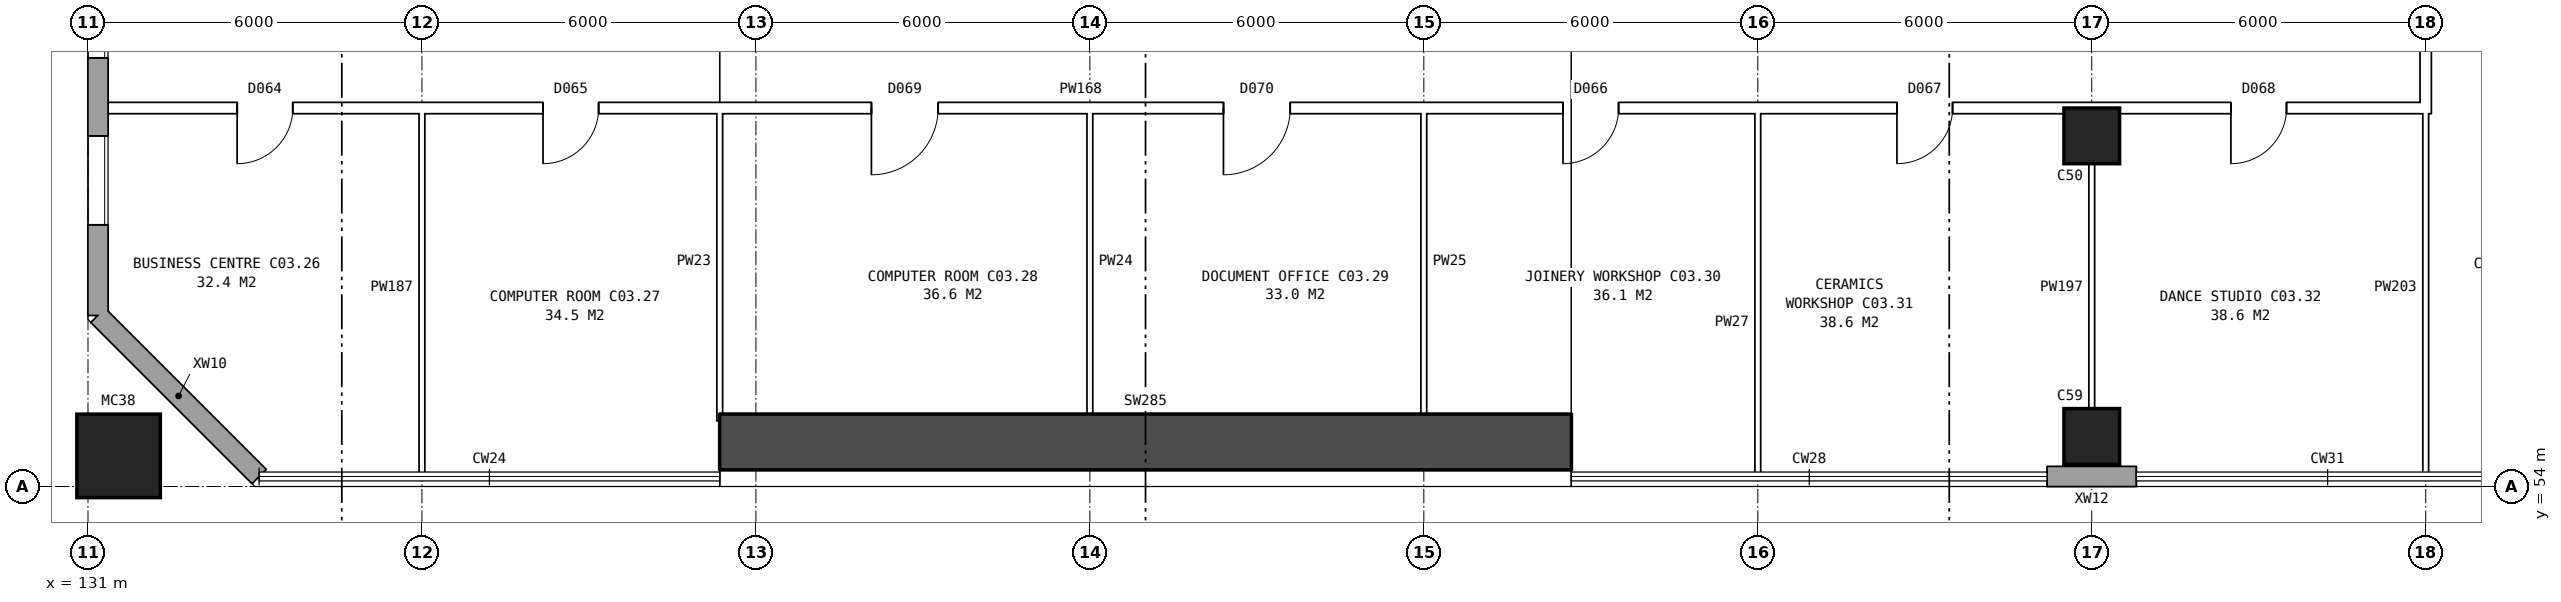
"""IFC4 building model, lengths in metres.
Left out: names, types, materials, properties, quantities, classifications, styles, units other than length and angle.
Written with IfcOpenShell. Run it as: python <this file> out.ifc"""

import sys

from ifc_helpers import new_model, si_unit, direction, frame, frame_2d, origin, origin_2d, place, context, subcontext, project, spatial, rectangle, hollow_rectangle, extrude, element, fill, save


model = new_model("IFC4")
c1 = context("Model", 3, precision=1e-05, world=origin(), true_north=direction((0.0, 1.0)))
c2 = subcontext(c1, "Body", "Model", "MODEL_VIEW")
j1 = project(units=[si_unit("LENGTHUNIT", "METRE"), si_unit("PLANEANGLEUNIT", "RADIAN")], contexts=[c1])
p1 = place(None, origin())
s1 = spatial("IfcSite", under=j1, at=p1, CompositionType="ELEMENT")
p2 = place(p1, origin())
s2 = spatial("IfcBuilding", under=s1, at=p2, CompositionType="ELEMENT")
p3 = place(p2, frame((0.0, 0.0, 14.7)))
s3 = spatial("IfcBuildingStorey", under=s2, at=p3, CompositionType="ELEMENT", Elevation=14.7)
p4 = place(p3, frame((142.35, 54.8, 0.0), z_axis=(0.0, 0.0, 1.0), x_axis=(1.0, 0.0, 0.0)))
e1 = element("IfcWall", 1, at=p4, inside=s3, PredefinedType="SHEAR", context=c2, shape_type="SweptSolid", body=[
    extrude(rectangle(XDim=15.3, YDim=1.0, at=frame_2d((7.65, 0.0))), origin(), (0.0, 0.0, 1.0), 4.0),
])
for number, where, z_axis, x_axis in (
    (2, (167.0, 54.9, 0.0), (0.0, 0.0, 1.0), (1.0, 0.0, 0.0)),
    (3, (167.0, 60.3, 0.0), (0.0, 0.0, 1.0), (1.0, 0.0, 0.0)),
):
    element("IfcColumn", number, at=place(p3, frame(where, z_axis=z_axis, x_axis=x_axis)), inside=s3, PredefinedType="COLUMN", context=c2, shape_type="SweptSolid", body=[
        extrude(rectangle(XDim=1.0, YDim=1.0, at=origin_2d()), origin(), (0.0, 0.0, 1.0), 4.0),
    ])
p5 = place(p3, frame((131.55, 54.55, 0.0), z_axis=(0.0, 0.0, 1.0), x_axis=(1.0, 0.0, 0.0)))
e4 = element("IfcColumn", 4, at=p5, inside=s3, PredefinedType="COLUMN", context=c2, shape_type="SweptSolid", body=[
    extrude(hollow_rectangle(XDim=1.5, YDim=1.5, WallThickness=0.08, at=origin_2d()), origin(), (0.0, 0.0, 1.0), 4.8),
])
p6 = place(p3, frame((131.18, 57.075, 0.0), z_axis=(0.0, 0.0, 1.0), x_axis=(0.707106781187, -0.707106781187, 0.0)))
e5 = element("IfcWall", 5, at=p6, inside=s3, PredefinedType="STANDARD", context=c2, shape_type="SweptSolid", body=[
    extrude(rectangle(XDim=4.094, YDim=0.36, at=frame_2d((2.047, 0.0))), origin(), (0.0, 0.0, 1.0), 4.0),
])
p7 = place(p3, frame((166.2, 54.18, 0.0), z_axis=(0.0, 0.0, 1.0), x_axis=(1.0, 0.0, 0.0)))
e6 = element("IfcWall", 6, at=p7, inside=s3, PredefinedType="STANDARD", context=c2, shape_type="SweptSolid", body=[
    extrude(rectangle(XDim=1.6, YDim=0.36, at=frame_2d((0.8, 0.0))), origin(), (0.0, 0.0, 1.0), 4.0),
])
p8 = place(p3, frame((131.18, 82.925, 0.0), z_axis=(0.0, 0.0, 1.0), x_axis=(0.0, -1.0, 0.0)))
e7 = element("IfcWall", 7, at=p8, inside=s3, PredefinedType="STANDARD", context=c2, shape_type="SweptSolid", body=[
    extrude(rectangle(XDim=25.851, YDim=0.36, at=frame_2d((12.925, 0.0))), origin(), (0.0, 0.0, 1.0), 4.0),
])
p9 = place(p8, frame((1.625, 0.0, 0.8)))
e8 = element("IfcOpeningElement", 8, at=p9, cuts=e7, PredefinedType="OPENING", context=c2, shape_type="SweptSolid", body=[
    extrude(rectangle(XDim=1.6, YDim=1.8, at=frame_2d((0.8, 0.9))), frame((0.0, 0.19, 0.0), z_axis=(0.0, -1.0, 0.0), x_axis=(1.0, 0.0, 0.0)), (0.0, 0.0, 1.0), 0.38),
])
p10 = place(p8, frame((4.625, 0.0, 0.8)))
e9 = element("IfcOpeningElement", 9, at=p10, cuts=e7, PredefinedType="OPENING", context=c2, shape_type="SweptSolid", body=[
    extrude(rectangle(XDim=1.6, YDim=1.8, at=frame_2d((0.8, 0.9))), frame((0.0, 0.19, 0.0), z_axis=(0.0, -1.0, 0.0), x_axis=(1.0, 0.0, 0.0)), (0.0, 0.0, 1.0), 0.38),
])
p11 = place(p8, frame((19.625, 0.0, 0.8)))
e10 = element("IfcOpeningElement", 10, at=p11, cuts=e7, PredefinedType="OPENING", context=c2, shape_type="SweptSolid", body=[
    extrude(rectangle(XDim=1.6, YDim=1.8, at=frame_2d((0.8, 0.9))), frame((0.0, 0.19, 0.0), z_axis=(0.0, -1.0, 0.0), x_axis=(1.0, 0.0, 0.0)), (0.0, 0.0, 1.0), 0.38),
])
p12 = place(p8, frame((22.625, 0.0, 0.8)))
e11 = element("IfcOpeningElement", 11, at=p12, cuts=e7, PredefinedType="OPENING", context=c2, shape_type="SweptSolid", body=[
    extrude(rectangle(XDim=1.6, YDim=1.8, at=frame_2d((0.8, 0.9))), frame((0.0, 0.19, 0.0), z_axis=(0.0, -1.0, 0.0), x_axis=(1.0, 0.0, 0.0)), (0.0, 0.0, 1.0), 0.38),
])
p13 = place(p3, frame((131.24, 60.8, 0.0), z_axis=(0.0, 0.0, 1.0), x_axis=(1.0, 0.0, 0.0)))
e12 = element("IfcWall", 12, at=p13, inside=s3, PredefinedType="PARTITIONING", context=c2, shape_type="SweptSolid", body=[
    extrude(rectangle(XDim=41.86, YDim=0.2, at=frame_2d((20.93, 0.0))), origin(), (0.0, 0.0, 1.0), 4.0),
])
p14 = place(p13, frame((2.44, 0.0, 0.0)))
e13 = element("IfcOpeningElement", 13, at=p14, cuts=e12, PredefinedType="OPENING", context=c2, shape_type="SweptSolid", body=[
    extrude(rectangle(XDim=1.0, YDim=2.1, at=frame_2d((0.5, 1.05))), frame((0.0, 0.11, 0.0), z_axis=(0.0, -1.0, 0.0), x_axis=(1.0, 0.0, 0.0)), (0.0, 0.0, 1.0), 0.22),
])
p15 = place(p13, frame((7.935, 0.0, 0.0)))
e14 = element("IfcOpeningElement", 14, at=p15, cuts=e12, PredefinedType="OPENING", context=c2, shape_type="SweptSolid", body=[
    extrude(rectangle(XDim=1.0, YDim=2.1, at=frame_2d((0.5, 1.05))), frame((0.0, 0.11, 0.0), z_axis=(0.0, -1.0, 0.0), x_axis=(1.0, 0.0, 0.0)), (0.0, 0.0, 1.0), 0.22),
])
p16 = place(p13, frame((13.835, 0.0, 0.0)))
e15 = element("IfcOpeningElement", 15, at=p16, cuts=e12, PredefinedType="OPENING", context=c2, shape_type="SweptSolid", body=[
    extrude(rectangle(XDim=1.2, YDim=2.1, at=frame_2d((0.6, 1.05))), frame((0.0, 0.11, 0.0), z_axis=(0.0, -1.0, 0.0), x_axis=(1.0, 0.0, 0.0)), (0.0, 0.0, 1.0), 0.22),
])
p17 = place(p13, frame((20.16, 0.0, 0.0)))
e16 = element("IfcOpeningElement", 16, at=p17, cuts=e12, PredefinedType="OPENING", context=c2, shape_type="SweptSolid", body=[
    extrude(rectangle(XDim=1.2, YDim=2.1, at=frame_2d((0.6, 1.05))), frame((0.0, 0.11, 0.0), z_axis=(0.0, -1.0, 0.0), x_axis=(1.0, 0.0, 0.0)), (0.0, 0.0, 1.0), 0.22),
])
p18 = place(p13, frame((26.26, 0.0, 0.0)))
e17 = element("IfcOpeningElement", 17, at=p18, cuts=e12, PredefinedType="OPENING", context=c2, shape_type="SweptSolid", body=[
    extrude(rectangle(XDim=1.0, YDim=2.1, at=frame_2d((0.5, 1.05))), frame((0.0, 0.11, 0.0), z_axis=(0.0, -1.0, 0.0), x_axis=(1.0, 0.0, 0.0)), (0.0, 0.0, 1.0), 0.22),
])
p19 = place(p13, frame((32.26, 0.0, 0.0)))
e18 = element("IfcOpeningElement", 18, at=p19, cuts=e12, PredefinedType="OPENING", context=c2, shape_type="SweptSolid", body=[
    extrude(rectangle(XDim=1.0, YDim=2.1, at=frame_2d((0.5, 1.05))), frame((0.0, 0.11, 0.0), z_axis=(0.0, -1.0, 0.0), x_axis=(1.0, 0.0, 0.0)), (0.0, 0.0, 1.0), 0.22),
])
p20 = place(p13, frame((38.26, 0.0, 0.0)))
e19 = element("IfcOpeningElement", 19, at=p20, cuts=e12, PredefinedType="OPENING", context=c2, shape_type="SweptSolid", body=[
    extrude(rectangle(XDim=1.0, YDim=2.1, at=frame_2d((0.5, 1.05))), frame((0.0, 0.11, 0.0), z_axis=(0.0, -1.0, 0.0), x_axis=(1.0, 0.0, 0.0)), (0.0, 0.0, 1.0), 0.22),
])
p21 = place(p3, frame((137.0, 54.24, 0.0), z_axis=(0.0, 0.0, 1.0), x_axis=(0.0, 1.0, 0.0)))
e20 = element("IfcWall", 20, at=p21, inside=s3, PredefinedType="PARTITIONING", context=c2, shape_type="SweptSolid", body=[
    extrude(rectangle(XDim=6.66, YDim=0.1, at=frame_2d((3.33, 0.0))), origin(), (0.0, 0.0, 1.0), 4.0),
])
for number, where, z_axis, x_axis in (
    (21, (142.35, 55.18, 0.0), (0.0, 0.0, 1.0), (0.0, 1.0, 0.0)),
    (22, (149.0, 55.18, 0.0), (0.0, 0.0, 1.0), (0.0, 1.0, 0.0)),
    (23, (155.0, 55.18, 0.0), (0.0, 0.0, 1.0), (0.0, 1.0, 0.0)),
):
    element("IfcWall", number, at=place(p3, frame(where, z_axis=z_axis, x_axis=x_axis)), inside=s3, PredefinedType="PARTITIONING", context=c2, shape_type="SweptSolid", body=[
        extrude(rectangle(XDim=5.72, YDim=0.1, at=frame_2d((2.86, 0.0))), origin(), (0.0, 0.0, 1.0), 4.0),
    ])
for number, where, z_axis, x_axis in (
    (24, (161.0, 54.24, 0.0), (0.0, 0.0, 1.0), (0.0, 1.0, 0.0)),
    (25, (167.0, 54.24, 0.0), (0.0, 0.0, 1.0), (0.0, 1.0, 0.0)),
):
    element("IfcWall", number, at=place(p3, frame(where, z_axis=z_axis, x_axis=x_axis)), inside=s3, PredefinedType="PARTITIONING", context=c2, shape_type="SweptSolid", body=[
        extrude(rectangle(XDim=6.66, YDim=0.1, at=frame_2d((3.33, 0.0))), origin(), (0.0, 0.0, 1.0), 4.0),
    ])
p22 = place(p3, frame((173.0, 60.7, 0.0), z_axis=(0.0, 0.0, 1.0), x_axis=(0.0, 1.0, 0.0)))
e26 = element("IfcWall", 26, at=p22, inside=s3, PredefinedType="PARTITIONING", context=c2, shape_type="SweptSolid", body=[
    extrude(rectangle(XDim=18.6, YDim=0.2, at=frame_2d((9.3, 0.0))), origin(), (0.0, 0.0, 1.0), 4.0),
])
p23 = place(p22, frame((1.2, 0.0, 0.0)))
e27 = element("IfcOpeningElement", 27, at=p23, cuts=e26, PredefinedType="OPENING", context=c2, shape_type="SweptSolid", body=[
    extrude(rectangle(XDim=1.0, YDim=2.1, at=frame_2d((0.5, 1.05))), frame((0.0, 0.11, 0.0), z_axis=(0.0, -1.0, 0.0), x_axis=(1.0, 0.0, 0.0)), (0.0, 0.0, 1.0), 0.22),
])
p24 = place(p22, frame((5.8, 0.0, 0.0)))
e28 = element("IfcOpeningElement", 28, at=p24, cuts=e26, PredefinedType="OPENING", context=c2, shape_type="SweptSolid", body=[
    extrude(rectangle(XDim=1.0, YDim=2.1, at=frame_2d((0.5, 1.05))), frame((0.0, 0.11, 0.0), z_axis=(0.0, -1.0, 0.0), x_axis=(1.0, 0.0, 0.0)), (0.0, 0.0, 1.0), 0.22),
])
p25 = place(p22, frame((11.8, 0.0, 0.0)))
e29 = element("IfcOpeningElement", 29, at=p25, cuts=e26, PredefinedType="OPENING", context=c2, shape_type="SweptSolid", body=[
    extrude(rectangle(XDim=1.0, YDim=2.1, at=frame_2d((0.5, 1.05))), frame((0.0, 0.11, 0.0), z_axis=(0.0, -1.0, 0.0), x_axis=(1.0, 0.0, 0.0)), (0.0, 0.0, 1.0), 0.22),
])
p26 = place(p22, frame((16.4, 0.0, 0.0)))
e30 = element("IfcOpeningElement", 30, at=p26, cuts=e26, PredefinedType="OPENING", context=c2, shape_type="SweptSolid", body=[
    extrude(rectangle(XDim=1.0, YDim=2.1, at=frame_2d((0.5, 1.05))), frame((0.0, 0.11, 0.0), z_axis=(0.0, -1.0, 0.0), x_axis=(1.0, 0.0, 0.0)), (0.0, 0.0, 1.0), 0.22),
])
p27 = place(p3, frame((173.0, 54.24, 0.0), z_axis=(0.0, 0.0, 1.0), x_axis=(0.0, 1.0, 0.0)))
e31 = element("IfcWall", 31, at=p27, inside=s3, PredefinedType="PARTITIONING", context=c2, shape_type="SweptSolid", body=[
    extrude(rectangle(XDim=6.66, YDim=0.1, at=frame_2d((3.33, 0.0))), origin(), (0.0, 0.0, 1.0), 4.0),
])
p28 = place(p11, origin())
e32 = element("IfcWindow", 32, at=p28, inside=s3, PartitioningType="SINGLE_PANEL", PredefinedType="WINDOW", context=c2, shape_type="SweptSolid", body=[
    extrude(rectangle(XDim=1.6, YDim=1.8, at=frame_2d((0.8, 0.9))), frame((0.0, 0.15, 0.0), z_axis=(0.0, -1.0, 0.0), x_axis=(1.0, 0.0, 0.0)), (0.0, 0.0, 1.0), 0.06),
])
fill(e10, e32)
p29 = place(p12, origin())
e33 = element("IfcWindow", 33, at=p29, inside=s3, PartitioningType="SINGLE_PANEL", PredefinedType="WINDOW", context=c2, shape_type="SweptSolid", body=[
    extrude(rectangle(XDim=1.6, YDim=1.8, at=frame_2d((0.8, 0.9))), frame((0.0, 0.15, 0.0), z_axis=(0.0, -1.0, 0.0), x_axis=(1.0, 0.0, 0.0)), (0.0, 0.0, 1.0), 0.06),
])
fill(e11, e33)
p30 = place(p14, frame((1.0, 0.0, 0.0), z_axis=(0.0, 0.0, 1.0), x_axis=(-1.0, 0.0, 0.0)))
e34 = element("IfcDoor", 34, at=p30, inside=s3, OperationType="SINGLE_SWING_RIGHT", PredefinedType="DOOR", context=c2, shape_type="SweptSolid", body=[
    extrude(rectangle(XDim=1.0, YDim=2.1, at=frame_2d((0.5, 1.05))), frame((0.0, 0.025, 0.0), z_axis=(0.0, -1.0, 0.0), x_axis=(1.0, 0.0, 0.0)), (0.0, 0.0, 1.0), 0.05),
])
fill(e13, e34)
p31 = place(p15, frame((1.0, 0.0, 0.0), z_axis=(0.0, 0.0, 1.0), x_axis=(-1.0, 0.0, 0.0)))
e35 = element("IfcDoor", 35, at=p31, inside=s3, OperationType="SINGLE_SWING_RIGHT", PredefinedType="DOOR", context=c2, shape_type="SweptSolid", body=[
    extrude(rectangle(XDim=1.0, YDim=2.1, at=frame_2d((0.5, 1.05))), frame((0.0, 0.025, 0.0), z_axis=(0.0, -1.0, 0.0), x_axis=(1.0, 0.0, 0.0)), (0.0, 0.0, 1.0), 0.05),
])
fill(e14, e35)
p32 = place(p16, frame((1.2, 0.0, 0.0), z_axis=(0.0, 0.0, 1.0), x_axis=(-1.0, 0.0, 0.0)))
e36 = element("IfcDoor", 36, at=p32, inside=s3, OperationType="SINGLE_SWING_RIGHT", PredefinedType="DOOR", context=c2, shape_type="SweptSolid", body=[
    extrude(rectangle(XDim=1.2, YDim=2.1, at=frame_2d((0.6, 1.05))), frame((0.0, 0.025, 0.0), z_axis=(0.0, -1.0, 0.0), x_axis=(1.0, 0.0, 0.0)), (0.0, 0.0, 1.0), 0.05),
])
fill(e15, e36)
p33 = place(p17, frame((1.2, 0.0, 0.0), z_axis=(0.0, 0.0, 1.0), x_axis=(-1.0, 0.0, 0.0)))
e37 = element("IfcDoor", 37, at=p33, inside=s3, OperationType="SINGLE_SWING_RIGHT", PredefinedType="DOOR", context=c2, shape_type="SweptSolid", body=[
    extrude(rectangle(XDim=1.2, YDim=2.1, at=frame_2d((0.6, 1.05))), frame((0.0, 0.025, 0.0), z_axis=(0.0, -1.0, 0.0), x_axis=(1.0, 0.0, 0.0)), (0.0, 0.0, 1.0), 0.05),
])
fill(e16, e37)
p34 = place(p18, frame((1.0, 0.0, 0.0), z_axis=(0.0, 0.0, 1.0), x_axis=(-1.0, 0.0, 0.0)))
e38 = element("IfcDoor", 38, at=p34, inside=s3, OperationType="SINGLE_SWING_RIGHT", PredefinedType="DOOR", context=c2, shape_type="SweptSolid", body=[
    extrude(rectangle(XDim=1.0, YDim=2.1, at=frame_2d((0.5, 1.05))), frame((0.0, 0.025, 0.0), z_axis=(0.0, -1.0, 0.0), x_axis=(1.0, 0.0, 0.0)), (0.0, 0.0, 1.0), 0.05),
])
fill(e17, e38)
p35 = place(p19, frame((1.0, 0.0, 0.0), z_axis=(0.0, 0.0, 1.0), x_axis=(-1.0, 0.0, 0.0)))
e39 = element("IfcDoor", 39, at=p35, inside=s3, OperationType="SINGLE_SWING_RIGHT", PredefinedType="DOOR", context=c2, shape_type="SweptSolid", body=[
    extrude(rectangle(XDim=1.0, YDim=2.1, at=frame_2d((0.5, 1.05))), frame((0.0, 0.025, 0.0), z_axis=(0.0, -1.0, 0.0), x_axis=(1.0, 0.0, 0.0)), (0.0, 0.0, 1.0), 0.05),
])
fill(e18, e39)
p36 = place(p20, frame((1.0, 0.0, 0.0), z_axis=(0.0, 0.0, 1.0), x_axis=(-1.0, 0.0, 0.0)))
e40 = element("IfcDoor", 40, at=p36, inside=s3, OperationType="SINGLE_SWING_RIGHT", PredefinedType="DOOR", context=c2, shape_type="SweptSolid", body=[
    extrude(rectangle(XDim=1.0, YDim=2.1, at=frame_2d((0.5, 1.05))), frame((0.0, 0.025, 0.0), z_axis=(0.0, -1.0, 0.0), x_axis=(1.0, 0.0, 0.0)), (0.0, 0.0, 1.0), 0.05),
])
fill(e19, e40)
save(model, sys.argv[1])
